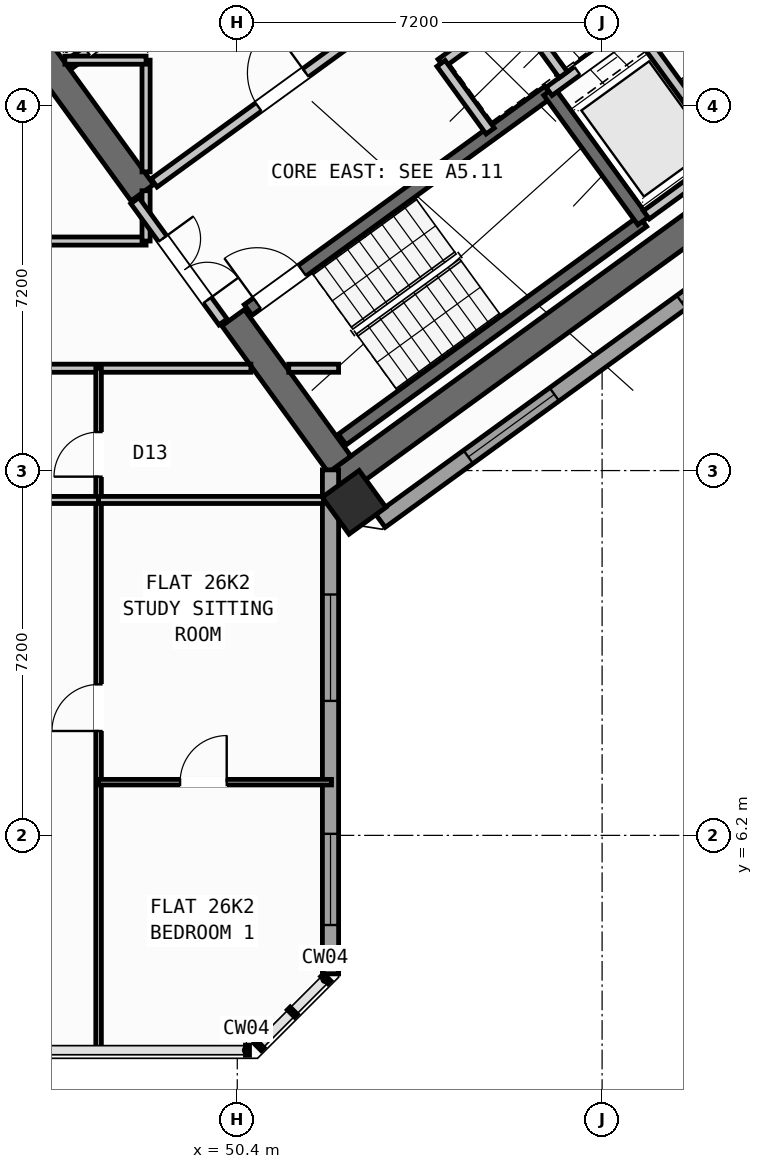
"""IFC4 building model, lengths in metres.
Left out: names, types, materials, properties, quantities, classifications, styles, units other than length and angle.
Written with IfcOpenShell. Run it as: python <this file> out.ifc"""

import sys

from ifc_helpers import new_model, si_unit, direction, frame, frame_2d, origin, origin_2d, place, context, subcontext, project, spatial, rectangle, hollow_rectangle, extrude, source, transform, mapped, element, fill, save


model = new_model("IFC4")
c1 = context("Model", 3, precision=1e-05, world=origin(), true_north=direction((0.0, 1.0)))
c2 = subcontext(c1, "Body", "Model", "MODEL_VIEW")
j1 = project(units=[si_unit("LENGTHUNIT", "METRE"), si_unit("PLANEANGLEUNIT", "RADIAN")], contexts=[c1])
p1 = place(None, origin())
s1 = spatial("IfcSite", under=j1, at=p1, CompositionType="ELEMENT")
p2 = place(p1, origin())
s2 = spatial("IfcBuilding", under=s1, at=p2, CompositionType="ELEMENT")
p3 = place(p2, frame((0.0, 0.0, 105.3)))
s3 = spatial("IfcBuildingStorey", under=s2, at=p3, CompositionType="ELEMENT", Elevation=105.3)
p4 = place(p3, frame((52.359, 13.14, 0.0), z_axis=(0.0, 0.0, 1.0), x_axis=(0.809014896919, 0.587788139183, 0.0)))
e1 = element("IfcWall", 1, at=p4, inside=s3, PredefinedType="SHEAR", context=c2, shape_type="SweptSolid", body=[
    extrude(rectangle(XDim=12.34, YDim=0.55, at=frame_2d((6.17, 0.0))), origin(), (0.0, 0.0, 1.0), 3.35),
])
p5 = place(p3, frame((52.42, 13.524, 0.0), z_axis=(0.0, 0.0, 1.0), x_axis=(-0.587802113096, 0.809004744015, 0.0)))
e2 = element("IfcWall", 2, at=p5, inside=s3, PredefinedType="SHEAR", context=c2, shape_type="SweptSolid", body=[
    extrude(rectangle(XDim=3.575, YDim=0.55, at=frame_2d((1.788, 0.0))), origin(), (0.0, 0.0, 1.0), 3.35),
])
p6 = place(p3, frame((48.526, 18.884, 0.0), z_axis=(0.0, 0.0, 1.0), x_axis=(-0.587764933797, 0.809031756236, 0.0)))
e3 = element("IfcWall", 3, at=p6, inside=s3, PredefinedType="SHEAR", context=c2, shape_type="SweptSolid", body=[
    extrude(rectangle(XDim=6.425, YDim=0.55, at=frame_2d((3.212, 0.0))), origin(), (0.0, 0.0, 1.0), 3.35),
])
m1 = source(origin(), c2, "Body", "SweptSolid", [
    extrude(hollow_rectangle(XDim=0.9, YDim=0.9, WallThickness=0.036, at=origin_2d()), origin(), (0.0, 0.0, 1.0), 3.6),
])
p7 = place(p3, frame((52.705, 12.773, 0.0), z_axis=(0.0, 0.0, 1.0), x_axis=(0.809016994375, 0.587785252292, 0.0)))
e4 = element("IfcColumn", 4, at=p7, inside=s3, PredefinedType="COLUMN", context=c2, shape_type="MappedRepresentation", body=[
    mapped(m1, transform((0.0, 0.0, 0.0), scale=1.0)),
])
p8 = place(p3, frame((67.454, 22.747, 0.0), z_axis=(0.0, 0.0, 1.0), x_axis=(-0.809021120468, -0.587779573171, 0.0)))
e5 = element("IfcWall", 5, at=p8, inside=s3, PredefinedType="STANDARD", context=c2, shape_type="SweptSolid", body=[
    extrude(rectangle(XDim=17.588, YDim=0.32, at=frame_2d((8.794, 0.0))), origin(), (0.0, 0.0, 1.0), 3.35),
])
p9 = place(p8, frame((1.624, 0.0, 0.0)))
e6 = element("IfcOpeningElement", 6, at=p9, cuts=e5, PredefinedType="OPENING", context=c2, shape_type="SweptSolid", body=[
    extrude(rectangle(XDim=1.05, YDim=2.15, at=frame_2d((0.525, 1.075))), frame((0.0, 0.17, 0.0), z_axis=(0.0, -1.0, 0.0), x_axis=(1.0, 0.0, 0.0)), (0.0, 0.0, 1.0), 0.34),
])
p10 = place(p8, frame((8.144, 0.0, 0.8)))
e7 = element("IfcOpeningElement", 7, at=p10, cuts=e5, PredefinedType="OPENING", context=c2, shape_type="SweptSolid", body=[
    extrude(rectangle(XDim=2.1, YDim=1.55, at=frame_2d((1.05, 0.775))), frame((0.0, 0.17, 0.0), z_axis=(0.0, -1.0, 0.0), x_axis=(1.0, 0.0, 0.0)), (0.0, 0.0, 1.0), 0.34),
])
p11 = place(p8, frame((13.344, 0.0, 0.8)))
e8 = element("IfcOpeningElement", 8, at=p11, cuts=e5, PredefinedType="OPENING", context=c2, shape_type="SweptSolid", body=[
    extrude(rectangle(XDim=2.1, YDim=1.55, at=frame_2d((1.05, 0.775))), frame((0.0, 0.17, 0.0), z_axis=(0.0, -1.0, 0.0), x_axis=(1.0, 0.0, 0.0)), (0.0, 0.0, 1.0), 0.34),
])
p12 = place(p3, frame((52.24, 13.414, 0.0), z_axis=(0.0, 0.0, 1.0), x_axis=(0.0, -1.0, 0.0)))
e9 = element("IfcWall", 9, at=p12, inside=s3, PredefinedType="STANDARD", context=c2, shape_type="SweptSolid", body=[
    extrude(rectangle(XDim=9.948, YDim=0.32, at=frame_2d((4.974, 0.0))), origin(), (0.0, 0.0, 1.0), 3.35),
])
p13 = place(p12, frame((2.46, 0.0, 0.8)))
e10 = element("IfcOpeningElement", 10, at=p13, cuts=e9, PredefinedType="OPENING", context=c2, shape_type="SweptSolid", body=[
    extrude(rectangle(XDim=2.1, YDim=1.55, at=frame_2d((1.05, 0.775))), frame((0.0, 0.17, 0.0), z_axis=(0.0, -1.0, 0.0), x_axis=(1.0, 0.0, 0.0)), (0.0, 0.0, 1.0), 0.34),
])
p14 = place(p12, frame((7.183, 0.0, 0.85)))
e11 = element("IfcOpeningElement", 11, at=p14, cuts=e9, PredefinedType="OPENING", context=c2, shape_type="SweptSolid", body=[
    extrude(rectangle(XDim=1.8, YDim=1.5, at=frame_2d((0.9, 0.75))), frame((0.0, 0.17, 0.0), z_axis=(0.0, -1.0, 0.0), x_axis=(1.0, 0.0, 0.0)), (0.0, 0.0, 1.0), 0.34),
])
p15 = place(p3, frame((52.472, 14.013, 0.0), z_axis=(0.0, 0.0, 1.0), x_axis=(0.809028366311, 0.587769599847, 0.0)))
e12 = element("IfcWall", 12, at=p15, inside=s3, PredefinedType="SHEAR", context=c2, shape_type="SweptSolid", body=[
    extrude(rectangle(XDim=7.33, YDim=0.26, at=frame_2d((3.665, 0.0))), origin(), (0.0, 0.0, 1.0), 3.35),
])
p16 = place(p3, frame((50.615, 16.57, 0.0), z_axis=(0.0, 0.0, 1.0), x_axis=(0.809028366311, 0.587769599847, 0.0)))
e13 = element("IfcWall", 13, at=p16, inside=s3, PredefinedType="SHEAR", context=c2, shape_type="SweptSolid", body=[
    extrude(rectangle(XDim=7.33, YDim=0.26, at=frame_2d((3.665, 0.0))), origin(), (0.0, 0.0, 1.0), 3.35),
])
p17 = place(p16, frame((0.22, 0.0, 0.0)))
e14 = element("IfcOpeningElement", 14, at=p17, cuts=e13, PredefinedType="OPENING", context=c2, shape_type="SweptSolid", body=[
    extrude(rectangle(XDim=1.1, YDim=2.1, at=frame_2d((0.55, 1.05))), frame((0.0, 0.14, 0.0), z_axis=(0.0, -1.0, 0.0), x_axis=(1.0, 0.0, 0.0)), (0.0, 0.0, 1.0), 0.28),
])
p18 = place(p3, frame((58.41, 18.327, 0.0), z_axis=(0.0, 0.0, 1.0), x_axis=(-0.58776738483, 0.809029975545, 0.0)))
e15 = element("IfcWall", 15, at=p18, inside=s3, PredefinedType="SHEAR", context=c2, shape_type="SweptSolid", body=[
    extrude(rectangle(XDim=3.16, YDim=0.26, at=frame_2d((1.58, 0.0))), origin(), (0.0, 0.0, 1.0), 3.35),
])
p19 = place(p3, frame((47.065, 21.407, 0.0), z_axis=(0.0, 0.0, 1.0), x_axis=(0.809032984992, 0.587763242466, 0.0)))
e16 = element("IfcWall", 16, at=p19, inside=s3, PredefinedType="STANDARD", context=c2, shape_type="SweptSolid", body=[
    extrude(rectangle(XDim=3.448, YDim=0.2, at=frame_2d((1.724, 0.0))), origin(), (0.0, 0.0, 1.0), 3.34),
])
p20 = place(p19, frame((0.458, 0.0, 0.0)))
e17 = element("IfcOpeningElement", 17, at=p20, cuts=e16, PredefinedType="OPENING", context=c2, shape_type="SweptSolid", body=[
    extrude(rectangle(XDim=1.3, YDim=2.2, at=frame_2d((0.65, 1.1))), frame((0.0, 0.11, 0.0), z_axis=(0.0, -1.0, 0.0), x_axis=(1.0, 0.0, 0.0)), (0.0, 0.0, 1.0), 0.22),
])
p21 = place(p3, frame((48.758, 19.077, 0.0), z_axis=(0.0, 0.0, 1.0), x_axis=(0.809005065155, 0.587801671104, 0.0)))
e18 = element("IfcWall", 18, at=p21, inside=s3, PredefinedType="STANDARD", context=c2, shape_type="SweptSolid", body=[
    extrude(rectangle(XDim=5.768, YDim=0.2, at=frame_2d((2.884, 0.0))), origin(), (0.0, 0.0, 1.0), 3.34),
])
p22 = place(p21, frame((2.548, 0.0, 0.0)))
e19 = element("IfcOpeningElement", 19, at=p22, cuts=e18, PredefinedType="OPENING", context=c2, shape_type="SweptSolid", body=[
    extrude(rectangle(XDim=1.15, YDim=2.1, at=frame_2d((0.575, 1.05))), frame((0.0, 0.11, 0.0), z_axis=(0.0, -1.0, 0.0), x_axis=(1.0, 0.0, 0.0)), (0.0, 0.0, 1.0), 0.22),
])
p23 = place(p3, frame((56.553, 20.884, 0.0), z_axis=(0.0, 0.0, 1.0), x_axis=(0.809023564264, 0.58777620951, 0.0)))
e20 = element("IfcWall", 20, at=p23, inside=s3, PredefinedType="STANDARD", context=c2, shape_type="SweptSolid", body=[
    extrude(rectangle(XDim=3.818, YDim=0.2, at=frame_2d((1.909, 0.0))), origin(), (0.0, 0.0, 1.0), 3.34),
])
p24 = place(p23, frame((0.69, 0.0, 0.0)))
e21 = element("IfcOpeningElement", 21, at=p24, cuts=e20, PredefinedType="OPENING", context=c2, shape_type="SweptSolid", body=[
    extrude(rectangle(XDim=1.1, YDim=2.15, at=frame_2d((0.55, 1.075))), frame((0.0, 0.11, 0.0), z_axis=(0.0, -1.0, 0.0), x_axis=(1.0, 0.0, 0.0)), (0.0, 0.0, 1.0), 0.22),
])
p25 = place(p23, frame((2.65, 0.0, 0.0)))
e22 = element("IfcOpeningElement", 22, at=p25, cuts=e20, PredefinedType="OPENING", context=c2, shape_type="SweptSolid", body=[
    extrude(rectangle(XDim=0.86, YDim=2.05, at=frame_2d((0.43, 1.025))), frame((0.0, 0.11, 0.0), z_axis=(0.0, -1.0, 0.0), x_axis=(1.0, 0.0, 0.0)), (0.0, 0.0, 1.0), 0.22),
])
p26 = place(p3, frame((54.421, 21.436, 0.0), z_axis=(0.0, 0.0, 1.0), x_axis=(0.809013710463, 0.587789772183, 0.0)))
e23 = element("IfcWall", 23, at=p26, inside=s3, PredefinedType="STANDARD", context=c2, shape_type="SweptSolid", body=[
    extrude(rectangle(XDim=5.36, YDim=0.2, at=frame_2d((2.68, 0.0))), origin(), (0.0, 0.0, 1.0), 3.34),
])
p27 = place(p3, frame((55.391, 20.102, 0.0), z_axis=(0.0, 0.0, 1.0), x_axis=(-0.58778447739, 0.809017557374, 0.0)))
e24 = element("IfcWall", 24, at=p27, inside=s3, PredefinedType="STANDARD", context=c2, shape_type="SweptSolid", body=[
    extrude(rectangle(XDim=1.65, YDim=0.2, at=frame_2d((0.825, 0.0))), origin(), (0.0, 0.0, 1.0), 3.34),
])
p28 = place(p3, frame((56.834, 21.212, 0.0), z_axis=(0.0, 0.0, 1.0), x_axis=(-0.58776738483, 0.809029975545, 0.0)))
e25 = element("IfcWall", 25, at=p28, inside=s3, PredefinedType="STANDARD", context=c2, shape_type="SweptSolid", body=[
    extrude(rectangle(XDim=1.58, YDim=0.2, at=frame_2d((0.79, 0.0))), origin(), (0.0, 0.0, 1.0), 3.34),
])
p29 = place(p3, frame((60.067, 19.655, 0.0), z_axis=(0.0, 0.0, 1.0), x_axis=(-0.587800520745, 0.809005900975, 0.0)))
e26 = element("IfcWall", 26, at=p29, inside=s3, PredefinedType="STANDARD", context=c2, shape_type="SweptSolid", body=[
    extrude(rectangle(XDim=2.66, YDim=0.2, at=frame_2d((1.33, 0.0))), origin(), (0.0, 0.0, 1.0), 3.34),
])
p30 = place(p3, frame((58.472, 18.447, 0.0), z_axis=(0.0, 0.0, 1.0), x_axis=(0.809018631237, 0.587782999339, 0.0)))
e27 = element("IfcWall", 27, at=p30, inside=s3, PredefinedType="STANDARD", context=c2, shape_type="SweptSolid", body=[
    extrude(rectangle(XDim=3.698, YDim=0.2, at=frame_2d((1.849, 0.0))), origin(), (0.0, 0.0, 1.0), 3.34),
])
p31 = place(p3, frame((35.237, 15.42, 0.0), z_axis=(0.0, 0.0, 1.0), x_axis=(1.0, 0.0, 0.0)))
e28 = element("IfcWall", 28, at=p31, inside=s3, PredefinedType="PARTITIONING", context=c2, shape_type="SweptSolid", body=[
    extrude(rectangle(XDim=15.432, YDim=0.16, at=frame_2d((7.716, 0.0))), origin(), (0.0, 0.0, 1.0), 3.34),
])
p32 = place(p31, frame((0.674, 0.0, 0.0)))
e29 = element("IfcOpeningElement", 29, at=p32, cuts=e28, PredefinedType="OPENING", context=c2, shape_type="SweptSolid", body=[
    extrude(rectangle(XDim=1.0, YDim=2.1, at=frame_2d((0.5, 1.05))), frame((0.0, 0.09, 0.0), z_axis=(0.0, -1.0, 0.0), x_axis=(1.0, 0.0, 0.0)), (0.0, 0.0, 1.0), 0.18),
])
p33 = place(p31, frame((9.094, 0.0, 0.0)))
e30 = element("IfcOpeningElement", 30, at=p33, cuts=e28, PredefinedType="OPENING", context=c2, shape_type="SweptSolid", body=[
    extrude(rectangle(XDim=1.0, YDim=2.1, at=frame_2d((0.5, 1.05))), frame((0.0, 0.09, 0.0), z_axis=(0.0, -1.0, 0.0), x_axis=(1.0, 0.0, 0.0)), (0.0, 0.0, 1.0), 0.18),
])
p34 = place(p3, frame((51.416, 15.42, 0.0), z_axis=(0.0, 0.0, 1.0), x_axis=(1.0, 0.0, 0.0)))
e31 = element("IfcWall", 31, at=p34, inside=s3, PredefinedType="PARTITIONING", context=c2, shape_type="SweptSolid", body=[
    extrude(rectangle(XDim=0.984, YDim=0.16, at=frame_2d((0.492, 0.0))), origin(), (0.0, 0.0, 1.0), 3.34),
])
p35 = place(p3, frame((38.65, 17.93, 0.0), z_axis=(0.0, 0.0, 1.0), x_axis=(1.0, 0.0, 0.0)))
e32 = element("IfcWall", 32, at=p35, inside=s3, PredefinedType="PARTITIONING", context=c2, shape_type="SweptSolid", body=[
    extrude(rectangle(XDim=9.95, YDim=0.16, at=frame_2d((4.975, 0.0))), origin(), (0.0, 0.0, 1.0), 3.34),
])
p36 = place(p35, frame((4.475, 0.0, 0.0)))
e33 = element("IfcOpeningElement", 33, at=p36, cuts=e32, PredefinedType="OPENING", context=c2, shape_type="SweptSolid", body=[
    extrude(rectangle(XDim=1.0, YDim=2.1, at=frame_2d((0.5, 1.05))), frame((0.0, 0.09, 0.0), z_axis=(0.0, -1.0, 0.0), x_axis=(1.0, 0.0, 0.0)), (0.0, 0.0, 1.0), 0.18),
])
p37 = place(p3, frame((48.6, 17.93, 0.0), z_axis=(0.0, 0.0, 1.0), x_axis=(0.0, 1.0, 0.0)))
e34 = element("IfcWall", 34, at=p37, inside=s3, PredefinedType="PARTITIONING", context=c2, shape_type="SweptSolid", body=[
    extrude(rectangle(XDim=0.993, YDim=0.16, at=frame_2d((0.496, 0.0))), origin(), (0.0, 0.0, 1.0), 3.34),
])
p38 = place(p3, frame((48.6, 19.295, 0.0), z_axis=(0.0, 0.0, 1.0), x_axis=(0.0, 1.0, 0.0)))
e35 = element("IfcWall", 35, at=p38, inside=s3, PredefinedType="PARTITIONING", context=c2, shape_type="SweptSolid", body=[
    extrude(rectangle(XDim=2.205, YDim=0.16, at=frame_2d((1.103, 0.0))), origin(), (0.0, 0.0, 1.0), 3.34),
])
p39 = place(p3, frame((46.998, 21.5, 0.0), z_axis=(0.0, 0.0, 1.0), x_axis=(1.0, 0.0, 0.0)))
e36 = element("IfcWall", 36, at=p39, inside=s3, PredefinedType="PARTITIONING", context=c2, shape_type="SweptSolid", body=[
    extrude(rectangle(XDim=1.602, YDim=0.16, at=frame_2d((0.801, 0.0))), origin(), (0.0, 0.0, 1.0), 3.34),
])
p40 = place(p3, frame((50.119, 16.333, 0.0), z_axis=(0.0, 0.0, 1.0), x_axis=(-0.587749856981, 0.809042709391, 0.0)))
e37 = element("IfcWall", 37, at=p40, inside=s3, PredefinedType="STANDARD", context=c2, shape_type="SweptSolid", body=[
    extrude(rectangle(XDim=2.96, YDim=0.2, at=frame_2d((1.48, 0.0))), origin(), (0.0, 0.0, 1.0), 3.34),
])
p41 = place(p40, frame((0.53, 0.0, 0.0)))
e38 = element("IfcOpeningElement", 38, at=p41, cuts=e37, PredefinedType="OPENING", context=c2, shape_type="SweptSolid", body=[
    extrude(rectangle(XDim=1.5, YDim=2.15, at=frame_2d((0.75, 1.075))), frame((0.0, 0.11, 0.0), z_axis=(0.0, -1.0, 0.0), x_axis=(1.0, 0.0, 0.0)), (0.0, 0.0, 1.0), 0.22),
])
p42 = place(p3, frame((47.663, 1.96, 0.0), z_axis=(0.0, 0.0, 1.0), x_axis=(0.0, 1.0, 0.0)))
e39 = element("IfcWall", 39, at=p42, inside=s3, PredefinedType="PARTITIONING", context=c2, shape_type="SweptSolid", body=[
    extrude(rectangle(XDim=13.46, YDim=0.11, at=frame_2d((6.73, 0.0))), origin(), (0.0, 0.0, 1.0), 3.34),
])
p43 = place(p42, frame((6.3, 0.0, 0.0)))
e40 = element("IfcOpeningElement", 40, at=p43, cuts=e39, PredefinedType="OPENING", context=c2, shape_type="SweptSolid", body=[
    extrude(rectangle(XDim=0.92, YDim=2.08, at=frame_2d((0.46, 1.04))), frame((0.0, 0.065, 0.0), z_axis=(0.0, -1.0, 0.0), x_axis=(1.0, 0.0, 0.0)), (0.0, 0.0, 1.0), 0.13),
])
p44 = place(p42, frame((11.32, 0.0, 0.0)))
e41 = element("IfcOpeningElement", 41, at=p44, cuts=e39, PredefinedType="OPENING", context=c2, shape_type="SweptSolid", body=[
    extrude(rectangle(XDim=0.88, YDim=2.08, at=frame_2d((0.44, 1.04))), frame((0.0, 0.065, 0.0), z_axis=(0.0, -1.0, 0.0), x_axis=(1.0, 0.0, 0.0)), (0.0, 0.0, 1.0), 0.13),
])
p45 = place(p3, frame((41.95, 12.82, 0.0), z_axis=(0.0, 0.0, 1.0), x_axis=(1.0, 0.0, 0.0)))
e42 = element("IfcWall", 42, at=p45, inside=s3, PredefinedType="PLUMBINGWALL", context=c2, shape_type="SweptSolid", body=[
    extrude(rectangle(XDim=5.713, YDim=0.14, at=frame_2d((2.856, 0.0))), origin(), (0.0, 0.0, 1.0), 2.525),
])
p46 = place(p45, frame((2.396, 0.0, 0.0)))
e43 = element("IfcOpeningElement", 43, at=p46, cuts=e42, PredefinedType="OPENING", context=c2, shape_type="SweptSolid", body=[
    extrude(rectangle(XDim=0.92, YDim=2.08, at=frame_2d((0.46, 1.04))), frame((0.0, 0.08, 0.0), z_axis=(0.0, -1.0, 0.0), x_axis=(1.0, 0.0, 0.0)), (0.0, 0.0, 1.0), 0.16),
])
p47 = place(p3, frame((47.663, 12.82, 0.0), z_axis=(0.0, 0.0, 1.0), x_axis=(1.0, 0.0, 0.0)))
e44 = element("IfcWall", 44, at=p47, inside=s3, PredefinedType="PLUMBINGWALL", context=c2, shape_type="SweptSolid", body=[
    extrude(rectangle(XDim=4.438, YDim=0.14, at=frame_2d((2.219, 0.0))), origin(), (0.0, 0.0, 1.0), 2.525),
])
p48 = place(p3, frame((47.663, 7.25, 0.0), z_axis=(0.0, 0.0, 1.0), x_axis=(1.0, 0.0, 0.0)))
e45 = element("IfcWall", 45, at=p48, inside=s3, PredefinedType="PARTITIONING", context=c2, shape_type="SweptSolid", body=[
    extrude(rectangle(XDim=4.597, YDim=0.11, at=frame_2d((2.298, 0.0))), origin(), (0.0, 0.0, 1.0), 3.34),
])
p49 = place(p48, frame((1.608, 0.0, 0.0)))
e46 = element("IfcOpeningElement", 46, at=p49, cuts=e45, PredefinedType="OPENING", context=c2, shape_type="SweptSolid", body=[
    extrude(rectangle(XDim=0.92, YDim=2.08, at=frame_2d((0.46, 1.04))), frame((0.0, 0.065, 0.0), z_axis=(0.0, -1.0, 0.0), x_axis=(1.0, 0.0, 0.0)), (0.0, 0.0, 1.0), 0.13),
])
p50 = place(p3, frame((64.709, 20.938, 0.0), z_axis=(0.0, 0.0, 1.0), x_axis=(-0.587781191743, 0.809019944521, 0.0)))
e47 = element("IfcWall", 47, at=p50, inside=s3, PredefinedType="PARTITIONING", context=c2, shape_type="SweptSolid", body=[
    extrude(rectangle(XDim=11.6, YDim=0.16, at=frame_2d((5.8, 0.0))), origin(), (0.0, 0.0, 1.0), 3.34),
])
m2 = source(origin(), c2, "Body", "SweptSolid", [
    extrude(rectangle(XDim=2.1, YDim=1.55, at=frame_2d((1.05, 0.775))), frame((0.0, 0.03, 0.0), z_axis=(0.0, -1.0, 0.0), x_axis=(1.0, 0.0, 0.0)), (0.0, 0.0, 1.0), 0.06),
])
p51 = place(p10, origin())
e48 = element("IfcWindow", 48, at=p51, inside=s3, PartitioningType="SINGLE_PANEL", PredefinedType="WINDOW", context=c2, shape_type="MappedRepresentation", body=[
    mapped(m2, transform((0.0, 0.0, 0.0), scale=1.0)),
])
fill(e7, e48)
p52 = place(p11, origin())
e49 = element("IfcWindow", 49, at=p52, inside=s3, PartitioningType="SINGLE_PANEL", PredefinedType="WINDOW", context=c2, shape_type="MappedRepresentation", body=[
    mapped(m2, transform((0.0, 0.0, 0.0), scale=1.0)),
])
fill(e8, e49)
p53 = place(p13, origin())
e50 = element("IfcWindow", 50, at=p53, inside=s3, PartitioningType="SINGLE_PANEL", PredefinedType="WINDOW", context=c2, shape_type="MappedRepresentation", body=[
    mapped(m2, transform((0.0, 0.0, 0.0), scale=1.0)),
])
fill(e10, e50)
m3 = source(origin(), c2, "Body", "SweptSolid", [
    extrude(rectangle(XDim=1.8, YDim=1.5, at=frame_2d((0.9, 0.75))), frame((0.0, 0.03, 0.0), z_axis=(0.0, -1.0, 0.0), x_axis=(1.0, 0.0, 0.0)), (0.0, 0.0, 1.0), 0.06),
])
p54 = place(p14, origin())
e51 = element("IfcWindow", 51, at=p54, inside=s3, PartitioningType="SINGLE_PANEL", PredefinedType="WINDOW", context=c2, shape_type="MappedRepresentation", body=[
    mapped(m3, transform((0.0, 0.0, 0.0), scale=1.0)),
])
fill(e11, e51)
m4 = source(origin(), c2, "Body", "SweptSolid", [
    extrude(rectangle(XDim=1.1, YDim=2.1, at=frame_2d((0.55, 1.05))), frame((0.0, 0.025, 0.0), z_axis=(0.0, -1.0, 0.0), x_axis=(1.0, 0.0, 0.0)), (0.0, 0.0, 1.0), 0.05),
])
p55 = place(p17, origin())
e52 = element("IfcDoor", 52, at=p55, inside=s3, OperationType="SINGLE_SWING_LEFT", PredefinedType="DOOR", context=c2, shape_type="MappedRepresentation", body=[
    mapped(m4, transform((0.0, 0.0, 0.0), scale=1.0)),
])
fill(e14, e52)
m5 = source(origin(), c2, "Body", "SweptSolid", [
    extrude(rectangle(XDim=1.15, YDim=2.1, at=frame_2d((0.575, 1.05))), frame((0.0, 0.025, 0.0), z_axis=(0.0, -1.0, 0.0), x_axis=(1.0, 0.0, 0.0)), (0.0, 0.0, 1.0), 0.05),
])
p56 = place(p22, origin())
e53 = element("IfcDoor", 53, at=p56, inside=s3, OperationType="SINGLE_SWING_RIGHT", PredefinedType="DOOR", context=c2, shape_type="MappedRepresentation", body=[
    mapped(m5, transform((0.0, 0.0, 0.0), scale=1.0)),
])
fill(e19, e53)
m6 = source(origin(), c2, "Body", "SweptSolid", [
    extrude(rectangle(XDim=1.3, YDim=2.2, at=frame_2d((0.65, 1.1))), frame((0.0, 0.025, 0.0), z_axis=(0.0, -1.0, 0.0), x_axis=(1.0, 0.0, 0.0)), (0.0, 0.0, 1.0), 0.05),
])
p57 = place(p20, origin())
e54 = element("IfcDoor", 54, at=p57, inside=s3, OperationType="DOUBLE_DOOR_SLIDING", PredefinedType="DOOR", context=c2, shape_type="MappedRepresentation", body=[
    mapped(m6, transform((0.0, 0.0, 0.0), scale=1.0)),
])
fill(e17, e54)
m7 = source(origin(), c2, "Body", "SweptSolid", [
    extrude(rectangle(XDim=1.1, YDim=2.15, at=frame_2d((0.55, 1.075))), frame((0.0, 0.025, 0.0), z_axis=(0.0, -1.0, 0.0), x_axis=(1.0, 0.0, 0.0)), (0.0, 0.0, 1.0), 0.05),
])
p58 = place(p24, origin())
e55 = element("IfcDoor", 55, at=p58, inside=s3, OperationType="DOUBLE_DOOR_SLIDING", PredefinedType="DOOR", context=c2, shape_type="MappedRepresentation", body=[
    mapped(m7, transform((0.0, 0.0, 0.0), scale=1.0)),
])
fill(e21, e55)
m8 = source(origin(), c2, "Body", "SweptSolid", [
    extrude(rectangle(XDim=1.5, YDim=2.15, at=frame_2d((0.75, 1.075))), frame((0.0, 0.025, 0.0), z_axis=(0.0, -1.0, 0.0), x_axis=(1.0, 0.0, 0.0)), (0.0, 0.0, 1.0), 0.05),
])
p59 = place(p41, frame((1.5, 0.0, 0.0), z_axis=(0.0, 0.0, 1.0), x_axis=(-1.0, 0.0, 0.0)))
e56 = element("IfcDoor", 56, at=p59, inside=s3, OperationType="DOUBLE_DOOR_SINGLE_SWING", PredefinedType="DOOR", context=c2, shape_type="MappedRepresentation", body=[
    mapped(m8, transform((0.0, 0.0, 0.0), scale=1.0)),
])
fill(e38, e56)
m9 = source(origin(), c2, "Body", "SweptSolid", [
    extrude(rectangle(XDim=0.92, YDim=2.08, at=frame_2d((0.46, 1.04))), frame((0.0, 0.025, 0.0), z_axis=(0.0, -1.0, 0.0), x_axis=(1.0, 0.0, 0.0)), (0.0, 0.0, 1.0), 0.05),
])
p60 = place(p43, origin())
e57 = element("IfcDoor", 57, at=p60, inside=s3, OperationType="SINGLE_SWING_LEFT", PredefinedType="DOOR", context=c2, shape_type="MappedRepresentation", body=[
    mapped(m9, transform((0.0, 0.0, 0.0), scale=1.0)),
])
fill(e40, e57)
p61 = place(p49, origin())
e58 = element("IfcDoor", 58, at=p61, inside=s3, OperationType="SINGLE_SWING_RIGHT", PredefinedType="DOOR", context=c2, shape_type="MappedRepresentation", body=[
    mapped(m9, transform((0.0, 0.0, 0.0), scale=1.0)),
])
fill(e46, e58)
m10 = source(origin(), c2, "Body", "SweptSolid", [
    extrude(rectangle(XDim=0.88, YDim=2.08, at=frame_2d((0.44, 1.04))), frame((0.0, 0.025, 0.0), z_axis=(0.0, -1.0, 0.0), x_axis=(1.0, 0.0, 0.0)), (0.0, 0.0, 1.0), 0.05),
])
p62 = place(p44, origin())
e59 = element("IfcDoor", 59, at=p62, inside=s3, OperationType="SINGLE_SWING_LEFT", PredefinedType="DOOR", context=c2, shape_type="MappedRepresentation", body=[
    mapped(m10, transform((0.0, 0.0, 0.0), scale=1.0)),
])
fill(e41, e59)
save(model, sys.argv[1])
